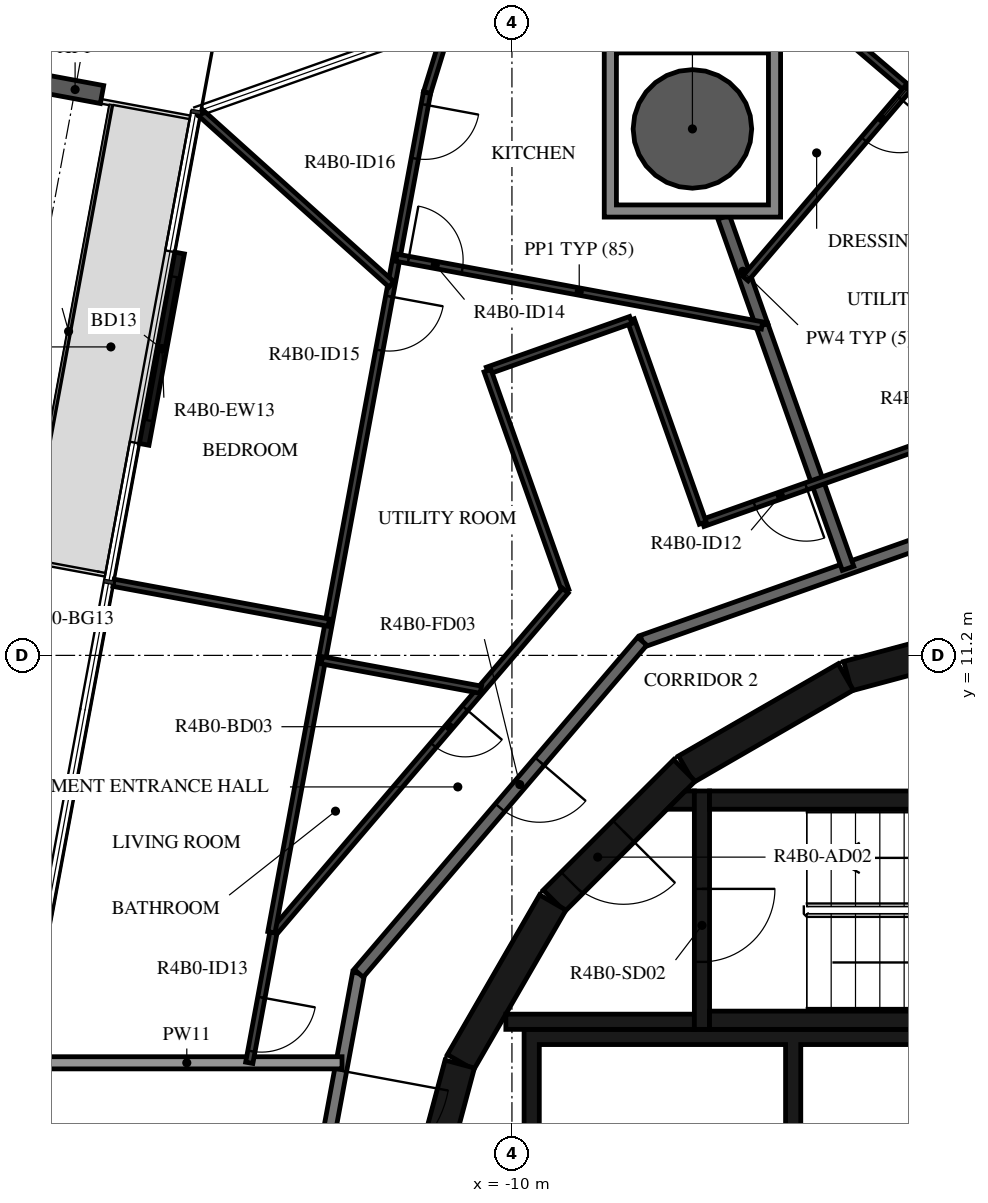
"""IFC4 building model, lengths in metres.
Left out: names, types, materials, properties, quantities, classifications, styles, units other than length and angle.
Written with IfcOpenShell. Run it as: python <this file> out.ifc"""

import sys

from ifc_helpers import new_model, si_unit, direction, frame, frame_2d, origin, origin_2d, place, context, subcontext, project, spatial, polyline, rectangle, hollow_circle, i_section, outline, extrude, element, fill, save


model = new_model("IFC4")
c1 = context("Model", 3, precision=1e-05, world=origin(), true_north=direction((0.0, 1.0)))
c2 = subcontext(c1, "Body", "Model", "MODEL_VIEW")
j1 = project(units=[si_unit("LENGTHUNIT", "METRE"), si_unit("PLANEANGLEUNIT", "RADIAN")], contexts=[c1])
p1 = place(None, origin())
s1 = spatial("IfcSite", under=j1, at=p1, CompositionType="ELEMENT")
p2 = place(p1, origin())
s2 = spatial("IfcBuilding", under=s1, at=p2, CompositionType="ELEMENT")
p3 = place(p2, frame((0.0, 0.0, 165.7)))
s3 = spatial("IfcBuildingStorey", under=s2, at=p3, CompositionType="ELEMENT", Elevation=165.7)
p4 = place(p3, frame((-7.032, 19.858, -0.38), z_axis=(0.0, 0.0, 1.0), x_axis=(1.0, 0.0, 0.0)))
e1 = element("IfcColumn", 1, at=p4, inside=s3, PredefinedType="COLUMN", context=c2, shape_type="SweptSolid", body=[
    extrude(hollow_circle(Radius=0.975, WallThickness=0.045, at=origin_2d()), origin(), (0.0, 0.0, 1.0), 3.5),
])
p5 = place(p3, frame((-17.184, 20.505, -0.38), z_axis=(0.0, 0.0, 1.0), x_axis=(0.182235967681, 0.983254825609, 0.0)))
e2 = element("IfcColumn", 2, at=p5, inside=s3, PredefinedType="COLUMN", context=c2, shape_type="SweptSolid", body=[
    extrude(i_section(OverallWidth=0.3, OverallDepth=0.9, WebThickness=0.019, FlangeThickness=0.035, FilletRadius=0.03, at=origin_2d()), origin(), (0.0, 0.0, 1.0), 3.5),
])
p6 = place(p3, frame((-15.465, 17.817, 0.0), z_axis=(0.0, 0.0, 1.0), x_axis=(-0.182201278434, -0.983261254264, 0.0)))
e3 = element("IfcWall", 3, at=p6, inside=s3, PredefinedType="STANDARD", context=c2, shape_type="SweptSolid", body=[
    extrude(rectangle(XDim=3.2, YDim=0.16, at=frame_2d((1.6, 0.0))), origin(), (0.0, 0.0, 1.0), 3.12),
])
p7 = place(p6, frame((0.4, 0.0, 0.0)))
e4 = element("IfcOpeningElement", 4, at=p7, cuts=e3, PredefinedType="OPENING", context=c2, shape_type="SweptSolid", body=[
    extrude(rectangle(XDim=2.4, YDim=2.4, at=frame_2d((1.2, 1.2))), frame((0.0, 0.09, 0.0), z_axis=(0.0, -1.0, 0.0), x_axis=(1.0, 0.0, 0.0)), (0.0, 0.0, 1.0), 0.18),
])
for number, where, z_axis, x_axis in (
    (5, (-1.55, 11.643, 0.0), (0.0, 0.0, 1.0), (-0.966, -0.259, 0.0)),
    (6, (-4.51, 10.845, 0.0), (0.0, 0.0, 1.0), (-0.866, -0.5, 0.0)),
):
    element("IfcWall", number, at=place(p3, frame(where, z_axis=z_axis, x_axis=x_axis)), inside=s3, PredefinedType="SHEAR", context=c2, shape_type="SweptSolid", body=[
        extrude(rectangle(XDim=3.033, YDim=0.5, at=frame_2d((1.516, 0.0))), origin(), (0.0, 0.0, 1.0), 3.12),
    ])
p8 = place(p3, frame((-7.164, 9.308, 0.0), z_axis=(0.0, 0.0, 1.0), x_axis=(-0.707106781187, -0.707106781187, 0.0)))
e7 = element("IfcWall", 7, at=p8, inside=s3, PredefinedType="SHEAR", context=c2, shape_type="SweptSolid", body=[
    extrude(rectangle(XDim=3.032, YDim=0.5, at=frame_2d((1.516, 0.0))), origin(), (0.0, 0.0, 1.0), 3.12),
])
p9 = place(p8, frame((1.416, 0.0, 0.0)))
e8 = element("IfcOpeningElement", 8, at=p9, cuts=e7, PredefinedType="OPENING", context=c2, shape_type="SweptSolid", body=[
    extrude(rectangle(XDim=1.2, YDim=2.1, at=frame_2d((0.6, 1.05))), frame((0.0, 0.26, 0.0), z_axis=(0.0, -1.0, 0.0), x_axis=(1.0, 0.0, 0.0)), (0.0, 0.0, 1.0), 0.52),
])
for number, where, z_axis, x_axis in (
    (9, (-9.329, 7.137, 0.0), (0.0, 0.0, 1.0), (-0.5, -0.866, 0.0)),
    (10, (-10.858, 4.479, 0.0), (0.0, 0.0, 1.0), (-0.259, -0.966, 0.0)),
):
    element("IfcWall", number, at=place(p3, frame(where, z_axis=z_axis, x_axis=x_axis)), inside=s3, PredefinedType="SHEAR", context=c2, shape_type="SweptSolid", body=[
        extrude(rectangle(XDim=3.033, YDim=0.5, at=frame_2d((1.516, 0.0))), origin(), (0.0, 0.0, 1.0), 3.12),
    ])
for number, where, z_axis, x_axis in (
    (11, (-6.75, 5.2, 0.0), (0.0, 0.0, 1.0), (1.0, 0.0, 0.0)),
    (12, (-6.75, 8.82, 0.0), (0.0, 0.0, 1.0), (1.0, 0.0, 0.0)),
):
    element("IfcWall", number, at=place(p3, frame(where, z_axis=z_axis, x_axis=x_axis)), inside=s3, PredefinedType="SHEAR", context=c2, shape_type="SweptSolid", body=[
        extrude(rectangle(XDim=6.75, YDim=0.3, at=frame_2d((3.375, 0.0))), origin(), (0.0, 0.0, 1.0), 3.12),
    ])
p10 = place(p3, frame((-6.875, 8.97, 0.0), z_axis=(0.0, 0.0, 1.0), x_axis=(0.0, -1.0, 0.0)))
e13 = element("IfcWall", 13, at=p10, inside=s3, PredefinedType="SHEAR", context=c2, shape_type="SweptSolid", body=[
    extrude(rectangle(XDim=3.92, YDim=0.25, at=frame_2d((1.96, 0.0))), origin(), (0.0, 0.0, 1.0), 3.12),
])
p11 = place(p10, frame((1.61, 0.0, 0.0)))
e14 = element("IfcOpeningElement", 14, at=p11, cuts=e13, PredefinedType="OPENING", context=c2, shape_type="SweptSolid", body=[
    extrude(rectangle(XDim=1.2, YDim=2.1, at=frame_2d((0.6, 1.05))), frame((0.0, 0.135, 0.0), z_axis=(0.0, -1.0, 0.0), x_axis=(1.0, 0.0, 0.0)), (0.0, 0.0, 1.0), 0.27),
])
p12 = place(p3, frame((-7.0, 5.175, 0.0), z_axis=(0.0, 0.0, 1.0), x_axis=(-1.0, 0.0, 0.0)))
e15 = element("IfcWall", 15, at=p12, inside=s3, PredefinedType="SHEAR", context=c2, shape_type="SweptSolid", body=[
    extrude(rectangle(XDim=3.1, YDim=0.25, at=frame_2d((1.55, 0.0))), origin(), (0.0, 0.0, 1.0), 3.12),
])
p13 = place(p3, origin())
e16 = element("IfcWall", 16, at=p13, inside=s3, PredefinedType="SHEAR", context=c2, shape_type="SweptSolid", body=[
    extrude(outline(polyline([(-7.148, 8.97), (-7.0, 8.97), (-7.0, 8.67), (-7.448, 8.67), (-7.148, 8.97)])), origin(), (0.0, 0.0, 1.0), 3.12),
])
p14 = place(p3, origin())
e17 = element("IfcWall", 17, at=p14, inside=s3, PredefinedType="SHEAR", context=c2, shape_type="SweptSolid", body=[
    extrude(outline(polyline([(-9.55, 4.8), (-5.5, 4.8), (-5.5, 1.9), (-5.25, 1.9), (-5.25, 4.8), (-1.2, 4.8), (-1.2, 1.9), (-0.95, 1.9), (-0.95, 4.8), (0.95, 4.8), (0.95, 1.9), (1.2, 1.9), (1.2, 4.8), (3.1, 4.8), (3.1, 1.9), (3.35, 1.9), (3.35, 4.8), (5.25, 4.8), (5.25, 1.9), (5.5, 1.9), (5.5, 4.8), (7.4, 4.8), (7.4, 1.9), (7.65, 1.9), (7.65, 4.8), (9.55, 4.8), (9.55, 1.9), (9.8, 1.9), (9.8, 4.8), (9.8, 5.05), (-9.8, 5.05), (-9.8, 4.8), (-9.8, 1.9), (-9.55, 1.9), (-9.55, 4.8)])), origin(), (0.0, 0.0, 1.0), 3.12),
])
p15 = place(p3, frame((-12.521, 5.972, 0.0), z_axis=(0.0, 0.0, 1.0), x_axis=(-0.182251559718, -0.983251935661, 0.0)))
e18 = element("IfcWall", 18, at=p15, inside=s3, PredefinedType="STANDARD", context=c2, shape_type="SweptSolid", body=[
    extrude(rectangle(XDim=5.117, YDim=0.2, at=frame_2d((2.559, 0.0))), origin(), (0.0, 0.0, 1.0), 3.12),
])
p16 = place(p15, frame((1.627, 0.0, 0.0)))
e19 = element("IfcOpeningElement", 19, at=p16, cuts=e18, PredefinedType="OPENING", context=c2, shape_type="SweptSolid", body=[
    extrude(rectangle(XDim=1.8, YDim=2.1, at=frame_2d((0.9, 1.05))), frame((0.0, 0.11, 0.0), z_axis=(0.0, -1.0, 0.0), x_axis=(1.0, 0.0, 0.0)), (0.0, 0.0, 1.0), 0.22),
])
p17 = place(p3, frame((-2.359, 13.38, 0.0), z_axis=(0.0, 0.0, 1.0), x_axis=(-0.942647529236, -0.333789807551, 0.0)))
e20 = element("IfcWall", 20, at=p17, inside=s3, PredefinedType="STANDARD", context=c2, shape_type="SweptSolid", body=[
    extrude(rectangle(XDim=5.833, YDim=0.2, at=frame_2d((2.917, 0.0))), origin(), (0.0, 0.0, 1.0), 3.12),
])
p18 = place(p3, frame((-7.858, 11.433, 0.0), z_axis=(0.0, 0.0, 1.0), x_axis=(-0.649440801937, -0.760412154545, 0.0)))
e21 = element("IfcWall", 21, at=p18, inside=s3, PredefinedType="STANDARD", context=c2, shape_type="SweptSolid", body=[
    extrude(rectangle(XDim=7.181, YDim=0.2, at=frame_2d((3.59, 0.0))), origin(), (0.0, 0.0, 1.0), 3.12),
])
p19 = place(p18, frame((2.6, 0.0, 0.0)))
e22 = element("IfcOpeningElement", 22, at=p19, cuts=e21, PredefinedType="OPENING", context=c2, shape_type="SweptSolid", body=[
    extrude(rectangle(XDim=1.0, YDim=2.1, at=frame_2d((0.5, 1.05))), frame((0.0, 0.11, 0.0), z_axis=(0.0, -1.0, 0.0), x_axis=(1.0, 0.0, 0.0)), (0.0, 0.0, 1.0), 0.22),
])
p20 = place(p3, frame((-12.794, 4.5, 0.0), z_axis=(0.0, 0.0, 1.0), x_axis=(-1.0, 0.0, 0.0)))
e23 = element("IfcWall", 23, at=p20, inside=s3, PredefinedType="STANDARD", context=c2, shape_type="SweptSolid", body=[
    extrude(rectangle(XDim=5.106, YDim=0.2, at=frame_2d((2.553, 0.0))), origin(), (0.0, 0.0, 1.0), 2.73),
])
p21 = place(p3, frame((-5.887, 16.626, 0.0), z_axis=(0.0, 0.0, 1.0), x_axis=(0.333820478853, -0.942636668021, 0.0)))
e24 = element("IfcWall", 24, at=p21, inside=s3, PredefinedType="STANDARD", context=c2, shape_type="SweptSolid", body=[
    extrude(rectangle(XDim=4.238, YDim=0.2, at=frame_2d((2.119, 0.0))), origin(), (0.0, 0.0, 1.0), 3.12),
])
p22 = place(p3, frame((-6.518, 18.408, 0.0), z_axis=(0.0, 0.0, 1.0), x_axis=(0.333725210903, -0.942670400303, 0.0)))
e25 = element("IfcWall", 25, at=p22, inside=s3, PredefinedType="STANDARD", context=c2, shape_type="SweptSolid", body=[
    extrude(rectangle(XDim=1.89, YDim=0.2, at=frame_2d((0.945, 0.0))), origin(), (0.0, 0.0, 1.0), 3.12),
])
p23 = place(p3, frame((-1.21, 15.378, 0.0), z_axis=(0.0, 0.0, 1.0), x_axis=(-0.9426440416, -0.333799656734, 0.0)))
e26 = element("IfcWall", 26, at=p23, inside=s3, PredefinedType="PARTITIONING", context=c2, shape_type="SweptSolid", body=[
    extrude(rectangle(XDim=5.996, YDim=0.12, at=frame_2d((2.998, 0.0))), origin(), (0.0, 0.0, 1.0), 3.12),
])
p24 = place(p23, frame((1.075, 0.0, 0.0)))
e27 = element("IfcOpeningElement", 27, at=p24, cuts=e26, PredefinedType="OPENING", context=c2, shape_type="SweptSolid", body=[
    extrude(rectangle(XDim=0.9, YDim=2.1, at=frame_2d((0.45, 1.05))), frame((0.0, 0.07, 0.0), z_axis=(0.0, -1.0, 0.0), x_axis=(1.0, 0.0, 0.0)), (0.0, 0.0, 1.0), 0.14),
])
p25 = place(p23, frame((4.192, 0.0, 0.0)))
e28 = element("IfcOpeningElement", 28, at=p25, cuts=e26, PredefinedType="OPENING", context=c2, shape_type="SweptSolid", body=[
    extrude(rectangle(XDim=0.9, YDim=2.1, at=frame_2d((0.45, 1.05))), frame((0.0, 0.07, 0.0), z_axis=(0.0, -1.0, 0.0), x_axis=(1.0, 0.0, 0.0)), (0.0, 0.0, 1.0), 0.14),
])
p26 = place(p3, frame((-4.983, 21.79, 0.0), z_axis=(0.0, 0.0, 1.0), x_axis=(0.760399838428, -0.649455222258, 0.0)))
e29 = element("IfcWall", 29, at=p26, inside=s3, PredefinedType="PARTITIONING", context=c2, shape_type="SweptSolid", body=[
    extrude(rectangle(XDim=11.234, YDim=0.12, at=frame_2d((5.617, 0.0))), origin(), (0.0, 0.0, 1.0), 3.12),
])
p27 = place(p3, frame((-3.495, 20.519, 0.0), z_axis=(0.0, 0.0, 1.0), x_axis=(-0.649433550281, -0.760418347865, 0.0)))
e30 = element("IfcWall", 30, at=p27, inside=s3, PredefinedType="PARTITIONING", context=c2, shape_type="SweptSolid", body=[
    extrude(rectangle(XDim=4.105, YDim=0.12, at=frame_2d((2.052, 0.0))), origin(), (0.0, 0.0, 1.0), 3.12),
])
p28 = place(p27, frame((0.2, 0.0, 0.0)))
e31 = element("IfcOpeningElement", 31, at=p28, cuts=e30, PredefinedType="OPENING", context=c2, shape_type="SweptSolid", body=[
    extrude(rectangle(XDim=0.9, YDim=2.1, at=frame_2d((0.45, 1.05))), frame((0.0, 0.07, 0.0), z_axis=(0.0, -1.0, 0.0), x_axis=(1.0, 0.0, 0.0)), (0.0, 0.0, 1.0), 0.14),
])
p29 = place(p3, frame((-6.862, 13.377, 0.0), z_axis=(0.0, 0.0, 1.0), x_axis=(-0.333868827671, 0.942619544625, 0.0)))
e32 = element("IfcWall", 32, at=p29, inside=s3, PredefinedType="PARTITIONING", context=c2, shape_type="SweptSolid", body=[
    extrude(rectangle(XDim=3.543, YDim=0.12, at=frame_2d((1.771, 0.0))), origin(), (0.0, 0.0, 1.0), 3.12),
])
p30 = place(p3, frame((-8.045, 16.716, 0.0), z_axis=(0.0, 0.0, 1.0), x_axis=(-0.942640030216, -0.333810984592, 0.0)))
e33 = element("IfcWall", 33, at=p30, inside=s3, PredefinedType="PARTITIONING", context=c2, shape_type="SweptSolid", body=[
    extrude(rectangle(XDim=2.5, YDim=0.12, at=frame_2d((1.25, 0.0))), origin(), (0.0, 0.0, 1.0), 3.12),
])
p31 = place(p3, frame((-10.402, 15.882, 0.0), z_axis=(0.0, 0.0, 1.0), x_axis=(0.33382476952, -0.942635148536, 0.0)))
e34 = element("IfcWall", 34, at=p31, inside=s3, PredefinedType="PARTITIONING", context=c2, shape_type="SweptSolid", body=[
    extrude(rectangle(XDim=3.838, YDim=0.12, at=frame_2d((1.919, 0.0))), origin(), (0.0, 0.0, 1.0), 3.12),
])
p32 = place(p3, frame((-9.12, 12.264, 0.0), z_axis=(0.0, 0.0, 1.0), x_axis=(-0.649444490942, -0.760409003882, 0.0)))
e35 = element("IfcWall", 35, at=p32, inside=s3, PredefinedType="PARTITIONING", context=c2, shape_type="SweptSolid", body=[
    extrude(rectangle(XDim=7.395, YDim=0.12, at=frame_2d((3.697, 0.0))), origin(), (0.0, 0.0, 1.0), 3.12),
])
p33 = place(p32, frame((2.542, 0.0, 0.0)))
e36 = element("IfcOpeningElement", 36, at=p33, cuts=e35, PredefinedType="OPENING", context=c2, shape_type="SweptSolid", body=[
    extrude(rectangle(XDim=0.8, YDim=2.1, at=frame_2d((0.4, 1.05))), frame((0.0, 0.07, 0.0), z_axis=(0.0, -1.0, 0.0), x_axis=(1.0, 0.0, 0.0)), (0.0, 0.0, 1.0), 0.14),
])
p34 = place(p3, frame((-13.923, 6.641, 0.0), z_axis=(0.0, 0.0, 1.0), x_axis=(-0.182209715759, -0.983259690765, 0.0)))
e37 = element("IfcWall", 37, at=p34, inside=s3, PredefinedType="PARTITIONING", context=c2, shape_type="SweptSolid", body=[
    extrude(rectangle(XDim=2.177, YDim=0.12, at=frame_2d((1.089, 0.0))), origin(), (0.0, 0.0, 1.0), 3.12),
])
p35 = place(p34, frame((1.083, 0.0, 0.0)))
e38 = element("IfcOpeningElement", 38, at=p35, cuts=e37, PredefinedType="OPENING", context=c2, shape_type="SweptSolid", body=[
    extrude(rectangle(XDim=0.9, YDim=2.1, at=frame_2d((0.45, 1.05))), frame((0.0, 0.07, 0.0), z_axis=(0.0, -1.0, 0.0), x_axis=(1.0, 0.0, 0.0)), (0.0, 0.0, 1.0), 0.14),
])
p36 = place(p3, frame((-13.955, 6.647, 0.0), z_axis=(0.0, 0.0, 1.0), x_axis=(0.182264522222, 0.983249532896, 0.0)))
e39 = element("IfcWall", 39, at=p36, inside=s3, PredefinedType="PARTITIONING", context=c2, shape_type="SweptSolid", body=[
    extrude(rectangle(XDim=4.589, YDim=0.12, at=frame_2d((2.294, 0.0))), origin(), (0.0, 0.0, 1.0), 3.12),
])
p37 = place(p3, frame((-11.034, 21.625, 0.0), z_axis=(0.0, 0.0, 1.0), x_axis=(-0.295260042089, -0.955416928647, 0.0)))
e40 = element("IfcWall", 40, at=p37, inside=s3, PredefinedType="PARTITIONING", context=c2, shape_type="SweptSolid", body=[
    extrude(rectangle(XDim=1.227, YDim=0.12, at=frame_2d((0.614, 0.0))), origin(), (0.0, 0.0, 1.0), 3.12),
])
p38 = place(p3, frame((-11.396, 20.453, 0.0), z_axis=(0.0, 0.0, 1.0), x_axis=(-0.182223370439, -0.983257160292, 0.0)))
e41 = element("IfcWall", 41, at=p38, inside=s3, PredefinedType="PARTITIONING", context=c2, shape_type="SweptSolid", body=[
    extrude(rectangle(XDim=9.452, YDim=0.12, at=frame_2d((4.726, 0.0))), origin(), (0.0, 0.0, 1.0), 3.12),
])
p39 = place(p38, frame((3.406, 0.0, 0.0)))
e42 = element("IfcOpeningElement", 42, at=p39, cuts=e41, PredefinedType="OPENING", context=c2, shape_type="SweptSolid", body=[
    extrude(rectangle(XDim=0.9, YDim=2.1, at=frame_2d((0.45, 1.05))), frame((0.0, 0.07, 0.0), z_axis=(0.0, -1.0, 0.0), x_axis=(1.0, 0.0, 0.0)), (0.0, 0.0, 1.0), 0.14),
])
p40 = place(p38, frame((0.2, 0.0, 0.0)))
e43 = element("IfcOpeningElement", 43, at=p40, cuts=e41, PredefinedType="OPENING", context=c2, shape_type="SweptSolid", body=[
    extrude(rectangle(XDim=0.9, YDim=2.1, at=frame_2d((0.45, 1.05))), frame((0.0, 0.07, 0.0), z_axis=(0.0, -1.0, 0.0), x_axis=(1.0, 0.0, 0.0)), (0.0, 0.0, 1.0), 0.14),
])
p41 = place(p3, frame((-11.899, 17.74, 0.0), z_axis=(0.0, 0.0, 1.0), x_axis=(0.983254721409, -0.182236529889, 0.0)))
e44 = element("IfcWall", 44, at=p41, inside=s3, PredefinedType="PARTITIONING", context=c2, shape_type="SweptSolid", body=[
    extrude(rectangle(XDim=6.114, YDim=0.12, at=frame_2d((3.057, 0.0))), origin(), (0.0, 0.0, 1.0), 3.12),
])
p42 = place(p41, frame((0.2, 0.0, 0.0)))
e45 = element("IfcOpeningElement", 45, at=p42, cuts=e44, PredefinedType="OPENING", context=c2, shape_type="SweptSolid", body=[
    extrude(rectangle(XDim=0.9, YDim=2.1, at=frame_2d((0.45, 1.05))), frame((0.0, 0.07, 0.0), z_axis=(0.0, -1.0, 0.0), x_axis=(1.0, 0.0, 0.0)), (0.0, 0.0, 1.0), 0.14),
])
p43 = place(p3, frame((-15.119, 20.122, 0.0), z_axis=(0.0, 0.0, 1.0), x_axis=(0.743711124749, -0.668501131581, 0.0)))
e46 = element("IfcWall", 46, at=p43, inside=s3, PredefinedType="PARTITIONING", context=c2, shape_type="SweptSolid", body=[
    extrude(rectangle(XDim=4.22, YDim=0.12, at=frame_2d((2.11, 0.0))), origin(), (0.0, 0.0, 1.0), 3.12),
])
p44 = place(p3, frame((-13.126, 11.12, 0.0), z_axis=(0.0, 0.0, 1.0), x_axis=(0.983257646361, -0.182220747645, 0.0)))
e47 = element("IfcWall", 47, at=p44, inside=s3, PredefinedType="PARTITIONING", context=c2, shape_type="SweptSolid", body=[
    extrude(rectangle(XDim=2.659, YDim=0.12, at=frame_2d((1.33, 0.0))), origin(), (0.0, 0.0, 1.0), 3.12),
])
p45 = place(p3, frame((-16.552, 12.394, 0.0), z_axis=(0.0, 0.0, 1.0), x_axis=(0.983257712156, -0.182220392618, 0.0)))
e48 = element("IfcWall", 48, at=p45, inside=s3, PredefinedType="PARTITIONING", context=c2, shape_type="SweptSolid", body=[
    extrude(rectangle(XDim=3.6, YDim=0.12, at=frame_2d((1.8, 0.0))), origin(), (0.0, 0.0, 1.0), 2.73),
])
p46 = place(p3, origin())
e49 = element("IfcWall", 49, at=p46, inside=s3, PredefinedType="STANDARD", context=c2, shape_type="SweptSolid", body=[
    extrude(outline(polyline([(-5.582, 21.308), (-5.582, 18.408), (-8.482, 18.408), (-8.482, 21.308), (-5.582, 21.308)]), holes=[polyline([(-8.282, 18.608), (-5.782, 18.608), (-5.782, 21.108), (-8.282, 21.108), (-8.282, 18.608)])]), origin(), (0.0, 0.0, 1.0), 3.12),
])
p47 = place(p7, origin())
e50 = element("IfcDoor", 50, at=p47, inside=s3, OperationType="DOUBLE_DOOR_SLIDING", PredefinedType="DOOR", context=c2, shape_type="SweptSolid", body=[
    extrude(rectangle(XDim=2.4, YDim=2.4, at=frame_2d((1.2, 1.2))), frame((0.0, 0.025, 0.0), z_axis=(0.0, -1.0, 0.0), x_axis=(1.0, 0.0, 0.0)), (0.0, 0.0, 1.0), 0.05),
])
fill(e4, e50)
p48 = place(p11, origin())
e51 = element("IfcDoor", 51, at=p48, inside=s3, OperationType="SINGLE_SWING_LEFT", PredefinedType="DOOR", context=c2, shape_type="SweptSolid", body=[
    extrude(rectangle(XDim=1.2, YDim=2.1, at=frame_2d((0.6, 1.05))), frame((0.0, 0.025, 0.0), z_axis=(0.0, -1.0, 0.0), x_axis=(1.0, 0.0, 0.0)), (0.0, 0.0, 1.0), 0.05),
])
fill(e14, e51)
p49 = place(p9, origin())
e52 = element("IfcDoor", 52, at=p49, inside=s3, OperationType="SINGLE_SWING_RIGHT", PredefinedType="DOOR", context=c2, shape_type="SweptSolid", body=[
    extrude(rectangle(XDim=1.2, YDim=2.1, at=frame_2d((0.6, 1.05))), frame((0.0, 0.025, 0.0), z_axis=(0.0, -1.0, 0.0), x_axis=(1.0, 0.0, 0.0)), (0.0, 0.0, 1.0), 0.05),
])
fill(e8, e52)
p50 = place(p28, origin())
e53 = element("IfcDoor", 53, at=p50, inside=s3, OperationType="SINGLE_SWING_RIGHT", PredefinedType="DOOR", context=c2, shape_type="SweptSolid", body=[
    extrude(rectangle(XDim=0.9, YDim=2.1, at=frame_2d((0.45, 1.05))), frame((0.0, 0.025, 0.0), z_axis=(0.0, -1.0, 0.0), x_axis=(1.0, 0.0, 0.0)), (0.0, 0.0, 1.0), 0.05),
])
fill(e31, e53)
p51 = place(p19, origin())
e54 = element("IfcDoor", 54, at=p51, inside=s3, OperationType="SINGLE_SWING_LEFT", PredefinedType="DOOR", context=c2, shape_type="SweptSolid", body=[
    extrude(rectangle(XDim=1.0, YDim=2.1, at=frame_2d((0.5, 1.05))), frame((0.0, 0.025, 0.0), z_axis=(0.0, -1.0, 0.0), x_axis=(1.0, 0.0, 0.0)), (0.0, 0.0, 1.0), 0.05),
])
fill(e22, e54)
p52 = place(p25, origin())
e55 = element("IfcDoor", 55, at=p52, inside=s3, OperationType="SINGLE_SWING_LEFT", PredefinedType="DOOR", context=c2, shape_type="SweptSolid", body=[
    extrude(rectangle(XDim=0.9, YDim=2.1, at=frame_2d((0.45, 1.05))), frame((0.0, 0.025, 0.0), z_axis=(0.0, -1.0, 0.0), x_axis=(1.0, 0.0, 0.0)), (0.0, 0.0, 1.0), 0.05),
])
fill(e28, e55)
p53 = place(p33, origin())
e56 = element("IfcDoor", 56, at=p53, inside=s3, OperationType="SINGLE_SWING_LEFT", PredefinedType="DOOR", context=c2, shape_type="SweptSolid", body=[
    extrude(rectangle(XDim=0.8, YDim=2.1, at=frame_2d((0.4, 1.05))), frame((0.0, 0.025, 0.0), z_axis=(0.0, -1.0, 0.0), x_axis=(1.0, 0.0, 0.0)), (0.0, 0.0, 1.0), 0.05),
])
fill(e36, e56)
p54 = place(p35, origin())
e57 = element("IfcDoor", 57, at=p54, inside=s3, OperationType="SINGLE_SWING_LEFT", PredefinedType="DOOR", context=c2, shape_type="SweptSolid", body=[
    extrude(rectangle(XDim=0.9, YDim=2.1, at=frame_2d((0.45, 1.05))), frame((0.0, 0.025, 0.0), z_axis=(0.0, -1.0, 0.0), x_axis=(1.0, 0.0, 0.0)), (0.0, 0.0, 1.0), 0.05),
])
fill(e38, e57)
p55 = place(p42, origin())
e58 = element("IfcDoor", 58, at=p55, inside=s3, OperationType="SINGLE_SWING_LEFT", PredefinedType="DOOR", context=c2, shape_type="SweptSolid", body=[
    extrude(rectangle(XDim=0.9, YDim=2.1, at=frame_2d((0.45, 1.05))), frame((0.0, 0.025, 0.0), z_axis=(0.0, -1.0, 0.0), x_axis=(1.0, 0.0, 0.0)), (0.0, 0.0, 1.0), 0.05),
])
fill(e45, e58)
p56 = place(p39, origin())
e59 = element("IfcDoor", 59, at=p56, inside=s3, OperationType="SINGLE_SWING_LEFT", PredefinedType="DOOR", context=c2, shape_type="SweptSolid", body=[
    extrude(rectangle(XDim=0.9, YDim=2.1, at=frame_2d((0.45, 1.05))), frame((0.0, 0.025, 0.0), z_axis=(0.0, -1.0, 0.0), x_axis=(1.0, 0.0, 0.0)), (0.0, 0.0, 1.0), 0.05),
])
fill(e42, e59)
p57 = place(p40, origin())
e60 = element("IfcDoor", 60, at=p57, inside=s3, OperationType="SINGLE_SWING_LEFT", PredefinedType="DOOR", context=c2, shape_type="SweptSolid", body=[
    extrude(rectangle(XDim=0.9, YDim=2.1, at=frame_2d((0.45, 1.05))), frame((0.0, 0.025, 0.0), z_axis=(0.0, -1.0, 0.0), x_axis=(1.0, 0.0, 0.0)), (0.0, 0.0, 1.0), 0.05),
])
fill(e43, e60)
p58 = place(p16, origin())
e61 = element("IfcDoor", 61, at=p58, inside=s3, OperationType="DOUBLE_DOOR_SINGLE_SWING", PredefinedType="DOOR", context=c2, shape_type="SweptSolid", body=[
    extrude(rectangle(XDim=1.8, YDim=2.1, at=frame_2d((0.9, 1.05))), frame((0.0, 0.025, 0.0), z_axis=(0.0, -1.0, 0.0), x_axis=(1.0, 0.0, 0.0)), (0.0, 0.0, 1.0), 0.05),
])
fill(e19, e61)
save(model, sys.argv[1])
